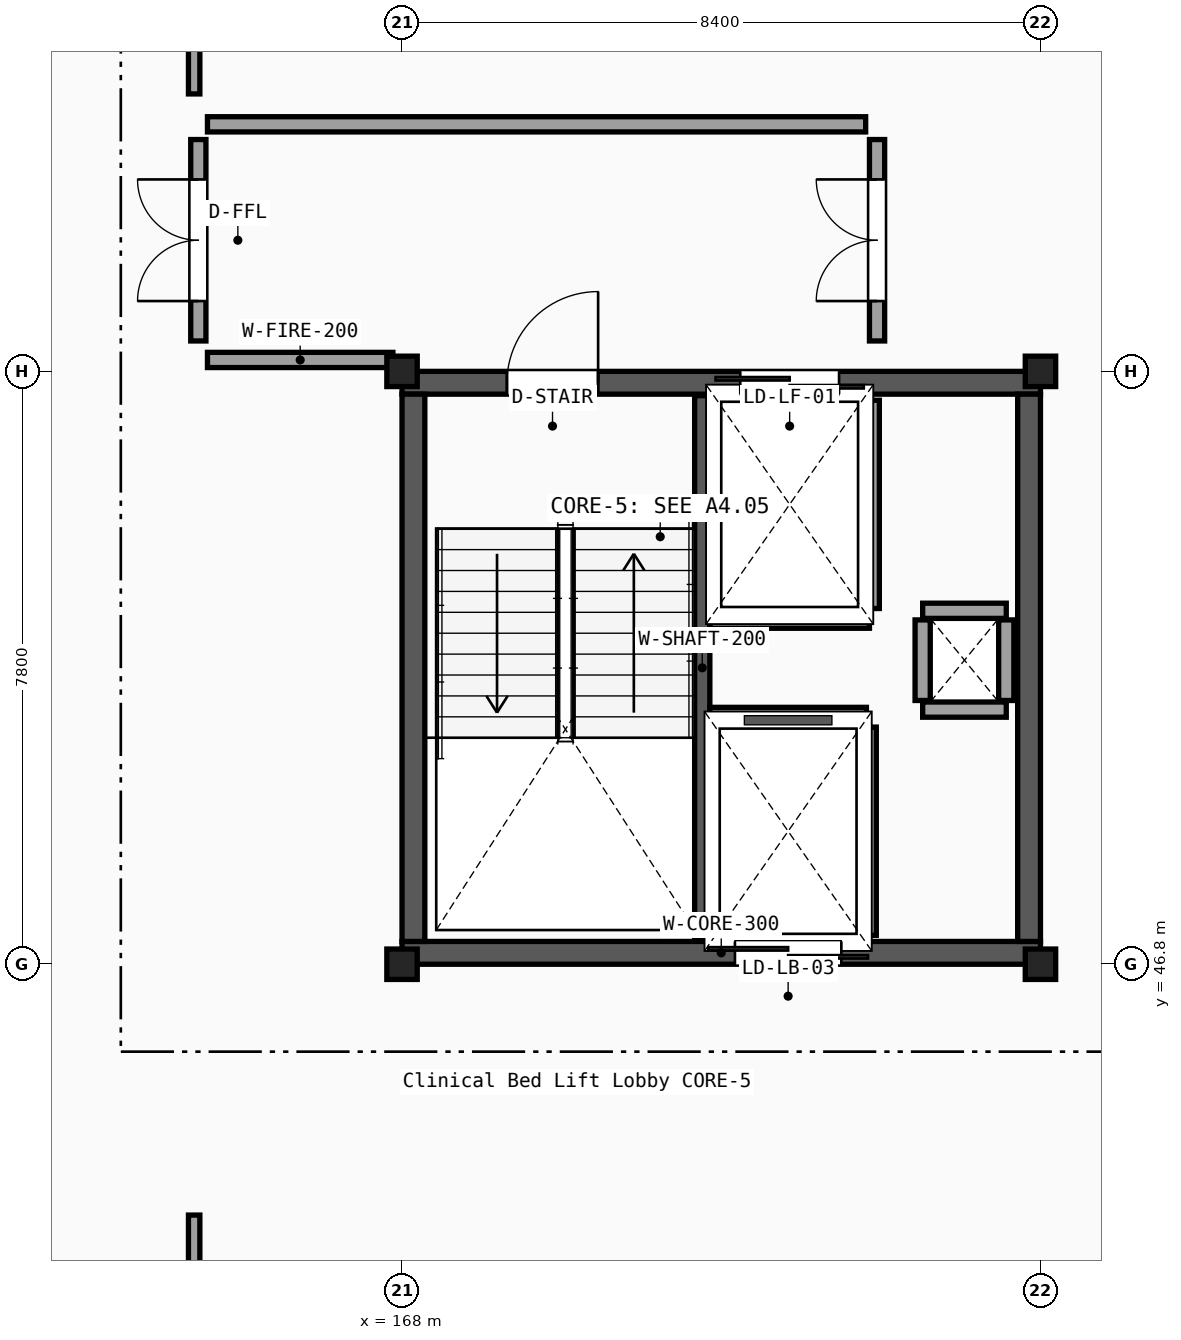
"""IFC4 building model, lengths in metres.
Left out: names, types, materials, properties, quantities, classifications, styles, units other than length and angle.
Written with IfcOpenShell. Run it as: python <this file> out.ifc"""

import sys

from ifc_helpers import new_model, si_unit, direction, frame, frame_2d, origin, origin_2d, place, context, subcontext, project, spatial, rectangle, i_section, extrude, element, fill, save


model = new_model("IFC4")
c1 = context("Model", 3, precision=1e-05, world=origin(), true_north=direction((0.0, 1.0)))
c2 = subcontext(c1, "Body", "Model", "MODEL_VIEW")
j1 = project(units=[si_unit("LENGTHUNIT", "METRE"), si_unit("PLANEANGLEUNIT", "RADIAN")], contexts=[c1])
p1 = place(None, origin())
s1 = spatial("IfcSite", under=j1, at=p1, CompositionType="ELEMENT")
p2 = place(p1, origin())
s2 = spatial("IfcBuilding", under=s1, at=p2, CompositionType="ELEMENT")
p3 = place(p2, frame((0.0, 0.0, 27.0)))
s3 = spatial("IfcBuildingStorey", under=s2, at=p3, CompositionType="ELEMENT", Elevation=27.0)
for number, where, z_axis, x_axis in (
    (1, (168.0, 46.8, 0.0), (0.0, 0.0, 1.0), (1.0, 0.0, 0.0)),
    (2, (168.0, 54.6, 0.0), (0.0, 0.0, 1.0), (1.0, 0.0, 0.0)),
    (3, (176.4, 46.8, 0.0), (0.0, 0.0, 1.0), (1.0, 0.0, 0.0)),
    (4, (176.4, 54.6, 0.0), (0.0, 0.0, 1.0), (1.0, 0.0, 0.0)),
):
    element("IfcColumn", number, at=place(p3, frame(where, z_axis=z_axis, x_axis=x_axis)), inside=s3, PredefinedType="COLUMN", context=c2, shape_type="SweptSolid", body=[
        extrude(i_section(OverallWidth=0.3, OverallDepth=0.4, WebThickness=0.013, FlangeThickness=0.024, FilletRadius=0.027, at=origin_2d()), origin(), (0.0, 0.0, 1.0), 4.05),
    ])
p4 = place(p3, frame((168.0, 46.95, 0.0), z_axis=(0.0, 0.0, 1.0), x_axis=(1.0, 0.0, 0.0)))
e5 = element("IfcWall", 5, at=p4, inside=s3, PredefinedType="SHEAR", context=c2, shape_type="SweptSolid", body=[
    extrude(rectangle(XDim=8.4, YDim=0.3, at=frame_2d((4.2, 0.0))), origin(), (0.0, 0.0, 1.0), 3.83),
])
p5 = place(p4, frame((4.38, 0.0, 0.0)))
e6 = element("IfcOpeningElement", 6, at=p5, cuts=e5, PredefinedType="OPENING", context=c2, shape_type="SweptSolid", body=[
    extrude(rectangle(XDim=1.4, YDim=2.2, at=frame_2d((0.7, 1.1))), frame((0.0, 0.16, 0.0), z_axis=(0.0, -1.0, 0.0), x_axis=(1.0, 0.0, 0.0)), (0.0, 0.0, 1.0), 0.32),
])
p6 = place(p3, frame((168.0, 54.45, 0.0), z_axis=(0.0, 0.0, 1.0), x_axis=(1.0, 0.0, 0.0)))
e7 = element("IfcWall", 7, at=p6, inside=s3, PredefinedType="SHEAR", context=c2, shape_type="SweptSolid", body=[
    extrude(rectangle(XDim=8.4, YDim=0.3, at=frame_2d((4.2, 0.0))), origin(), (0.0, 0.0, 1.0), 3.83),
])
p7 = place(p6, frame((1.38, 0.0, 0.0)))
e8 = element("IfcOpeningElement", 8, at=p7, cuts=e7, PredefinedType="OPENING", context=c2, shape_type="SweptSolid", body=[
    extrude(rectangle(XDim=1.2, YDim=2.15, at=frame_2d((0.6, 1.075))), frame((0.0, 0.16, 0.0), z_axis=(0.0, -1.0, 0.0), x_axis=(1.0, 0.0, 0.0)), (0.0, 0.0, 1.0), 0.32),
])
p8 = place(p6, frame((4.45, 0.0, 0.0)))
e9 = element("IfcOpeningElement", 9, at=p8, cuts=e7, PredefinedType="OPENING", context=c2, shape_type="SweptSolid", body=[
    extrude(rectangle(XDim=1.3, YDim=2.2, at=frame_2d((0.65, 1.1))), frame((0.0, 0.16, 0.0), z_axis=(0.0, -1.0, 0.0), x_axis=(1.0, 0.0, 0.0)), (0.0, 0.0, 1.0), 0.32),
])
for number, where, z_axis, x_axis in (
    (10, (168.15, 47.1, 0.0), (0.0, 0.0, 1.0), (0.0, 1.0, 0.0)),
    (11, (176.25, 47.1, 0.0), (0.0, 0.0, 1.0), (0.0, 1.0, 0.0)),
):
    element("IfcWall", number, at=place(p3, frame(where, z_axis=z_axis, x_axis=x_axis)), inside=s3, PredefinedType="SHEAR", context=c2, shape_type="SweptSolid", body=[
        extrude(rectangle(XDim=7.2, YDim=0.3, at=frame_2d((3.6, 0.0))), origin(), (0.0, 0.0, 1.0), 3.83),
    ])
p9 = place(p3, frame((171.95, 47.12, 0.0), z_axis=(0.0, 0.0, 1.0), x_axis=(0.0, 1.0, 0.0)))
e12 = element("IfcWall", 12, at=p9, inside=s3, PredefinedType="SHEAR", context=c2, shape_type="SweptSolid", body=[
    extrude(rectangle(XDim=7.16, YDim=0.2, at=frame_2d((3.58, 0.0))), origin(), (0.0, 0.0, 1.0), 3.83),
])
for number, where, z_axis, x_axis in (
    (13, (174.85, 50.15, 0.0), (0.0, 0.0, 1.0), (1.0, 0.0, 0.0)),
    (14, (174.85, 51.45, 0.0), (0.0, 0.0, 1.0), (1.0, 0.0, 0.0)),
):
    element("IfcWall", number, at=place(p3, frame(where, z_axis=z_axis, x_axis=x_axis)), inside=s3, PredefinedType="PARTITIONING", context=c2, shape_type="SweptSolid", body=[
        extrude(rectangle(XDim=1.1, YDim=0.2, at=frame_2d((0.55, 0.0))), origin(), (0.0, 0.0, 1.0), 3.26),
    ])
for number, where, z_axis, x_axis in (
    (15, (174.85, 50.27, 0.0), (0.0, 0.0, 1.0), (0.0, 1.0, 0.0)),
    (16, (175.95, 50.27, 0.0), (0.0, 0.0, 1.0), (0.0, 1.0, 0.0)),
):
    element("IfcWall", number, at=place(p3, frame(where, z_axis=z_axis, x_axis=x_axis)), inside=s3, PredefinedType="PARTITIONING", context=c2, shape_type="SweptSolid", body=[
        extrude(rectangle(XDim=1.06, YDim=0.2, at=frame_2d((0.53, 0.0))), origin(), (0.0, 0.0, 1.0), 3.26),
    ])
p10 = place(p3, frame((174.18, 51.48, 0.0), z_axis=(0.0, 0.0, 1.0), x_axis=(0.0, 1.0, 0.0)))
e17 = element("IfcWall", 17, at=p10, inside=s3, PredefinedType="PARTITIONING", context=c2, shape_type="SweptSolid", body=[
    extrude(rectangle(XDim=2.74, YDim=0.2, at=frame_2d((1.37, 0.0))), origin(), (0.0, 0.0, 1.0), 3.26),
])
p11 = place(p3, frame((172.05, 51.32, 0.0), z_axis=(0.0, 0.0, 1.0), x_axis=(1.0, 0.0, 0.0)))
e18 = element("IfcWall", 18, at=p11, inside=s3, PredefinedType="PARTITIONING", context=c2, shape_type="SweptSolid", body=[
    extrude(rectangle(XDim=2.1, YDim=0.2, at=frame_2d((1.05, 0.0))), origin(), (0.0, 0.0, 1.0), 3.26),
])
p12 = place(p3, frame((174.14, 47.18, 0.0), z_axis=(0.0, 0.0, 1.0), x_axis=(0.0, 1.0, 0.0)))
e19 = element("IfcWall", 19, at=p12, inside=s3, PredefinedType="PARTITIONING", context=c2, shape_type="SweptSolid", body=[
    extrude(rectangle(XDim=2.74, YDim=0.2, at=frame_2d((1.37, 0.0))), origin(), (0.0, 0.0, 1.0), 3.26),
])
p13 = place(p3, frame((172.05, 50.08, 0.0), z_axis=(0.0, 0.0, 1.0), x_axis=(1.0, 0.0, 0.0)))
e20 = element("IfcWall", 20, at=p13, inside=s3, PredefinedType="PARTITIONING", context=c2, shape_type="SweptSolid", body=[
    extrude(rectangle(XDim=2.06, YDim=0.2, at=frame_2d((1.03, 0.0))), origin(), (0.0, 0.0, 1.0), 3.26),
])
p14 = place(p3, frame((165.44, 54.75, 0.0), z_axis=(0.0, 0.0, 1.0), x_axis=(1.0, 0.0, 0.0)))
e21 = element("IfcWall", 21, at=p14, inside=s3, PredefinedType="PARTITIONING", context=c2, shape_type="SweptSolid", body=[
    extrude(rectangle(XDim=2.44, YDim=0.2, at=frame_2d((1.22, 0.0))), origin(), (0.0, 0.0, 1.0), 3.26),
])
p15 = place(p3, frame((165.44, 57.85, 0.0), z_axis=(0.0, 0.0, 1.0), x_axis=(1.0, 0.0, 0.0)))
e22 = element("IfcWall", 22, at=p15, inside=s3, PredefinedType="PARTITIONING", context=c2, shape_type="SweptSolid", body=[
    extrude(rectangle(XDim=8.66, YDim=0.2, at=frame_2d((4.33, 0.0))), origin(), (0.0, 0.0, 1.0), 3.26),
])
p16 = place(p3, frame((165.32, 55.0, 0.0), z_axis=(0.0, 0.0, 1.0), x_axis=(0.0, 1.0, 0.0)))
e23 = element("IfcWall", 23, at=p16, inside=s3, PredefinedType="PARTITIONING", context=c2, shape_type="SweptSolid", body=[
    extrude(rectangle(XDim=2.65, YDim=0.2, at=frame_2d((1.325, 0.0))), origin(), (0.0, 0.0, 1.0), 3.26),
])
p17 = place(p16, frame((0.525, 0.0, 0.0)))
e24 = element("IfcOpeningElement", 24, at=p17, cuts=e23, PredefinedType="OPENING", context=c2, shape_type="SweptSolid", body=[
    extrude(rectangle(XDim=1.6, YDim=2.2, at=frame_2d((0.8, 1.1))), frame((0.0, 0.11, 0.0), z_axis=(0.0, -1.0, 0.0), x_axis=(1.0, 0.0, 0.0)), (0.0, 0.0, 1.0), 0.22),
])
p18 = place(p3, frame((174.25, 55.0, 0.0), z_axis=(0.0, 0.0, 1.0), x_axis=(0.0, 1.0, 0.0)))
e25 = element("IfcWall", 25, at=p18, inside=s3, PredefinedType="PARTITIONING", context=c2, shape_type="SweptSolid", body=[
    extrude(rectangle(XDim=2.65, YDim=0.2, at=frame_2d((1.325, 0.0))), origin(), (0.0, 0.0, 1.0), 3.26),
])
p19 = place(p18, frame((0.525, 0.0, 0.0)))
e26 = element("IfcOpeningElement", 26, at=p19, cuts=e25, PredefinedType="OPENING", context=c2, shape_type="SweptSolid", body=[
    extrude(rectangle(XDim=1.6, YDim=2.2, at=frame_2d((0.8, 1.1))), frame((0.0, 0.11, 0.0), z_axis=(0.0, -1.0, 0.0), x_axis=(1.0, 0.0, 0.0)), (0.0, 0.0, 1.0), 0.22),
])
p20 = place(p3, frame((165.265, 39.62, 0.0), z_axis=(0.0, 0.0, 1.0), x_axis=(0.0, 1.0, 0.0)))
e27 = element("IfcWall", 27, at=p20, inside=s3, PredefinedType="PARTITIONING", context=c2, shape_type="SweptSolid", body=[
    extrude(rectangle(XDim=3.88, YDim=0.15, at=frame_2d((1.94, 0.0))), origin(), (0.0, 0.0, 1.0), 3.77),
])
p21 = place(p20, frame((1.415, 0.0, 0.0)))
e28 = element("IfcOpeningElement", 28, at=p21, cuts=e27, PredefinedType="OPENING", context=c2, shape_type="SweptSolid", body=[
    extrude(rectangle(XDim=1.05, YDim=2.15, at=frame_2d((0.525, 1.075))), frame((0.0, 0.085, 0.0), z_axis=(0.0, -1.0, 0.0), x_axis=(1.0, 0.0, 0.0)), (0.0, 0.0, 1.0), 0.17),
])
p22 = place(p3, frame((165.265, 58.25, 0.0), z_axis=(0.0, 0.0, 1.0), x_axis=(0.0, 1.0, 0.0)))
e29 = element("IfcWall", 29, at=p22, inside=s3, PredefinedType="PARTITIONING", context=c2, shape_type="SweptSolid", body=[
    extrude(rectangle(XDim=8.65, YDim=0.15, at=frame_2d((4.325, 0.0))), origin(), (0.0, 0.0, 1.0), 3.26),
])
p23 = place(p22, frame((3.8, 0.0, 0.0)))
e30 = element("IfcOpeningElement", 30, at=p23, cuts=e29, PredefinedType="OPENING", context=c2, shape_type="SweptSolid", body=[
    extrude(rectangle(XDim=1.05, YDim=2.15, at=frame_2d((0.525, 1.075))), frame((0.0, 0.085, 0.0), z_axis=(0.0, -1.0, 0.0), x_axis=(1.0, 0.0, 0.0)), (0.0, 0.0, 1.0), 0.17),
])
p24 = place(p7, origin())
e31 = element("IfcDoor", 31, at=p24, inside=s3, OperationType="SINGLE_SWING_RIGHT", PredefinedType="DOOR", context=c2, shape_type="SweptSolid", body=[
    extrude(rectangle(XDim=1.2, YDim=2.15, at=frame_2d((0.6, 1.075))), frame((0.0, 0.025, 0.0), z_axis=(0.0, -1.0, 0.0), x_axis=(1.0, 0.0, 0.0)), (0.0, 0.0, 1.0), 0.05),
])
fill(e8, e31)
p25 = place(p8, origin())
e32 = element("IfcDoor", 32, at=p25, inside=s3, OperationType="DOUBLE_DOOR_SLIDING", PredefinedType="DOOR", context=c2, shape_type="SweptSolid", body=[
    extrude(rectangle(XDim=1.3, YDim=2.2, at=frame_2d((0.65, 1.1))), frame((0.0, 0.025, 0.0), z_axis=(0.0, -1.0, 0.0), x_axis=(1.0, 0.0, 0.0)), (0.0, 0.0, 1.0), 0.05),
])
fill(e9, e32)
p26 = place(p5, origin())
e33 = element("IfcDoor", 33, at=p26, inside=s3, OperationType="DOUBLE_DOOR_SLIDING", PredefinedType="DOOR", context=c2, shape_type="SweptSolid", body=[
    extrude(rectangle(XDim=1.4, YDim=2.2, at=frame_2d((0.7, 1.1))), frame((0.0, 0.025, 0.0), z_axis=(0.0, -1.0, 0.0), x_axis=(1.0, 0.0, 0.0)), (0.0, 0.0, 1.0), 0.05),
])
fill(e6, e33)
p27 = place(p17, origin())
e34 = element("IfcDoor", 34, at=p27, inside=s3, OperationType="DOUBLE_DOOR_SINGLE_SWING", PredefinedType="DOOR", context=c2, shape_type="SweptSolid", body=[
    extrude(rectangle(XDim=1.6, YDim=2.2, at=frame_2d((0.8, 1.1))), frame((0.0, 0.025, 0.0), z_axis=(0.0, -1.0, 0.0), x_axis=(1.0, 0.0, 0.0)), (0.0, 0.0, 1.0), 0.05),
])
fill(e24, e34)
p28 = place(p19, origin())
e35 = element("IfcDoor", 35, at=p28, inside=s3, OperationType="DOUBLE_DOOR_SINGLE_SWING", PredefinedType="DOOR", context=c2, shape_type="SweptSolid", body=[
    extrude(rectangle(XDim=1.6, YDim=2.2, at=frame_2d((0.8, 1.1))), frame((0.0, 0.025, 0.0), z_axis=(0.0, -1.0, 0.0), x_axis=(1.0, 0.0, 0.0)), (0.0, 0.0, 1.0), 0.05),
])
fill(e26, e35)
save(model, sys.argv[1])
